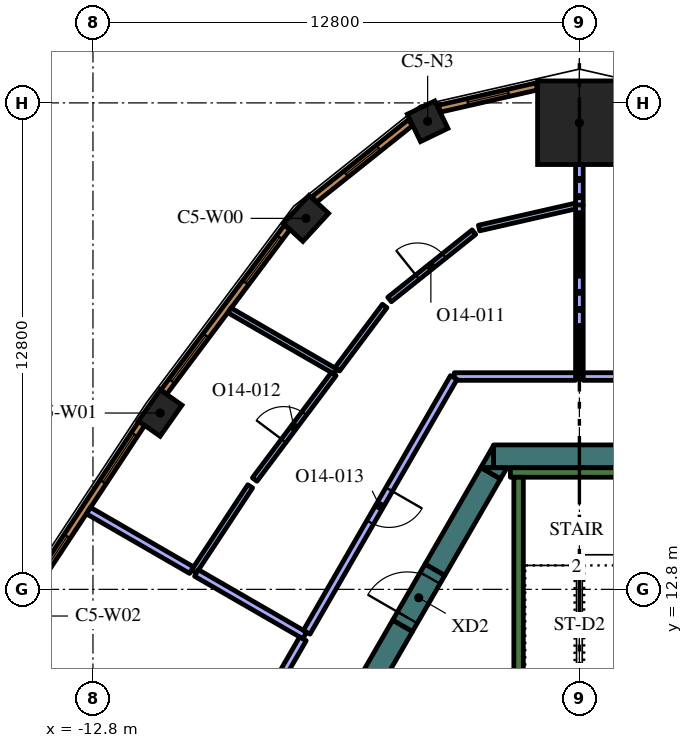
"""IFC4 building model, lengths in metres.
Left out: names, types, materials, properties, quantities, classifications, styles, units other than length and angle.
Written with IfcOpenShell. Run it as: python <this file> out.ifc"""

import sys

from ifc_helpers import new_model, si_unit, direction, frame, frame_2d, origin, origin_2d, place, context, subcontext, project, spatial, polyline, rectangle, outline, extrude, element, fill, save


model = new_model("IFC4")
c1 = context("Model", 3, precision=1e-05, world=origin(), true_north=direction((0.0, 1.0)))
c2 = subcontext(c1, "Body", "Model", "MODEL_VIEW")
j1 = project(units=[si_unit("LENGTHUNIT", "METRE"), si_unit("PLANEANGLEUNIT", "RADIAN")], contexts=[c1])
p1 = place(None, origin())
s1 = spatial("IfcSite", under=j1, at=p1, CompositionType="ELEMENT")
p2 = place(p1, origin())
s2 = spatial("IfcBuilding", under=s1, at=p2, CompositionType="ELEMENT")
p3 = place(p2, frame((0.0, 0.0, 304.8)))
s3 = spatial("IfcBuildingStorey", under=s2, at=p3, CompositionType="ELEMENT", Elevation=304.8)
p4 = place(p3, frame((0.0, 25.078, 0.0), z_axis=(0.0, 0.0, 1.0), x_axis=(0.0, 1.0, 0.0)))
e1 = element("IfcColumn", 1, at=p4, inside=s3, PredefinedType="COLUMN", context=c2, shape_type="SweptSolid", body=[
    extrude(rectangle(XDim=2.2, YDim=2.2, at=origin_2d()), origin(), (0.0, 0.0, 1.0), 4.2),
])
p5 = place(p3, frame((-3.993, 25.116, 0.0), z_axis=(0.0, 0.0, 1.0), x_axis=(-0.900873321869, -0.434082086644, 0.0)))
e2 = element("IfcColumn", 2, at=p5, inside=s3, PredefinedType="COLUMN", context=c2, shape_type="SweptSolid", body=[
    extrude(rectangle(XDim=0.8, YDim=0.8, at=origin_2d()), origin(), (0.0, 0.0, 1.0), 4.2),
])
for number, where, z_axis, x_axis in (
    (3, (-7.195, 22.561, 0.0), (0.0, 0.0, 1.0), (-0.676, -0.737, 0.0)),
    (4, (-11.032, 17.44, 0.0), (0.0, 0.0, 1.0), (-0.575, -0.818, 0.0)),
):
    element("IfcColumn", number, at=place(p3, frame(where, z_axis=z_axis, x_axis=x_axis)), inside=s3, PredefinedType="COLUMN", context=c2, shape_type="SweptSolid", body=[
        extrude(rectangle(XDim=1.0, YDim=0.7, at=origin_2d()), origin(), (0.0, 0.0, 1.0), 4.2),
    ])
p6 = place(p3, frame((-2.258, 16.3, 0.0), z_axis=(0.0, 0.0, 1.0), x_axis=(1.0, 0.0, 0.0)))
e5 = element("IfcWall", 5, at=p6, inside=s3, PredefinedType="SOLIDWALL", context=c2, shape_type="SweptSolid", body=[
    extrude(rectangle(XDim=3.823, YDim=0.6, at=frame_2d((1.912, 0.0))), origin(), (0.0, 0.0, 1.0), 4.2),
])
p7 = place(p3, origin())
e6 = element("IfcWall", 6, at=p7, inside=s3, PredefinedType="SOLIDWALL", context=c2, shape_type="SweptSolid", body=[
    extrude(outline(polyline([(-2.598, 16.0), (-2.26, 16.585), (-2.26, 16.0), (-2.598, 16.0)])), origin(), (0.0, 0.0, 1.0), 4.2),
])
p8 = place(p3, frame((-2.335, 15.855, 0.0), z_axis=(0.0, 0.0, 1.0), x_axis=(-0.499960127962, -0.866048422692, 0.0)))
e7 = element("IfcWall", 7, at=p8, inside=s3, PredefinedType="SOLIDWALL", context=c2, shape_type="SweptSolid", body=[
    extrude(rectangle(XDim=2.934, YDim=0.6, at=frame_2d((1.467, 0.0))), origin(), (0.0, 0.0, 1.0), 4.2),
])
e8 = element("IfcWall", 8, at=p7, inside=s3, PredefinedType="SOLIDWALL", context=c2, shape_type="SweptSolid", body=[
    extrude(outline(polyline([(-1.905, 16.0), (-2.074, 15.707), (-2.581, 16.0), (-1.905, 16.0)])), origin(), (0.0, 0.0, 1.0), 4.2),
])
p9 = place(p3, frame((-12.582, -1.892, 0.0), z_axis=(0.0, 0.0, 1.0), x_axis=(0.500003640647, 0.866023301845, 0.0)))
e9 = element("IfcWall", 9, at=p9, inside=s3, PredefinedType="SOLIDWALL", context=c2, shape_type="SweptSolid", body=[
    extrude(rectangle(XDim=15.858, YDim=0.6, at=frame_2d((7.929, 0.0))), origin(), (0.0, 0.0, 1.0), 4.2),
])
p10 = place(p3, frame((-1.817, 15.875, 0.0), z_axis=(0.0, 0.0, 1.0), x_axis=(1.0, 0.0, 0.0)))
e10 = element("IfcWall", 10, at=p10, inside=s3, PredefinedType="SOLIDWALL", context=c2, shape_type="SweptSolid", body=[
    extrude(rectangle(XDim=3.634, YDim=0.25, at=frame_2d((1.817, 0.0))), origin(), (0.0, 0.0, 1.0), 4.2),
])
p11 = place(p3, frame((-1.6, 8.7, 0.0), z_axis=(0.0, 0.0, 1.0), x_axis=(0.0, 1.0, 0.0)))
e11 = element("IfcWall", 11, at=p11, inside=s3, PredefinedType="SOLIDWALL", context=c2, shape_type="SweptSolid", body=[
    extrude(rectangle(XDim=7.05, YDim=0.25, at=frame_2d((3.525, 0.0))), origin(), (0.0, 0.0, 1.0), 4.2),
])
p12 = place(p3, frame((-4.652, 11.842, 0.0), z_axis=(0.0, 0.0, 1.0), x_axis=(0.500062241894, 0.865989465428, 0.0)))
e12 = element("IfcWall", 12, at=p12, inside=s3, PredefinedType="SOLIDWALL", context=c2, shape_type="SweptSolid", body=[
    extrude(rectangle(XDim=1.7, YDim=0.6, at=frame_2d((0.85, 0.0))), origin(), (0.0, 0.0, 1.0), 4.2),
])
p13 = place(p12, frame((0.25, 0.0, 0.0)))
e13 = element("IfcOpeningElement", 13, at=p13, cuts=e12, PredefinedType="OPENING", context=c2, shape_type="SweptSolid", body=[
    extrude(rectangle(XDim=1.2, YDim=2.1, at=frame_2d((0.6, 1.05))), frame((0.0, 0.31, 0.0), z_axis=(0.0, -1.0, 0.0), x_axis=(1.0, 0.0, 0.0)), (0.0, 0.0, 1.0), 0.62),
])
p14 = place(p3, frame((0.0, 22.906, 0.0), z_axis=(0.0, 0.0, 1.0), x_axis=(0.0, 1.0, 0.0)))
e14 = element("IfcWall", 14, at=p14, inside=s3, PredefinedType="PARTITIONING", context=c2, shape_type="SweptSolid", body=[
    extrude(rectangle(XDim=1.072, YDim=0.2, at=frame_2d((0.536, 0.0))), origin(), (0.0, 0.0, 1.0), 3.55),
])
p15 = place(p3, frame((0.0, 18.4, 0.0), z_axis=(0.0, 0.0, 1.0), x_axis=(0.0, 1.0, 0.0)))
e15 = element("IfcWall", 15, at=p15, inside=s3, PredefinedType="PARTITIONING", context=c2, shape_type="SweptSolid", body=[
    extrude(rectangle(XDim=4.514, YDim=0.2, at=frame_2d((2.257, 0.0))), origin(), (0.0, 0.0, 1.0), 3.55),
])
p16 = place(p3, frame((3.261, 18.4, 0.0), z_axis=(0.0, 0.0, 1.0), x_axis=(-1.0, 0.0, 0.0)))
e16 = element("IfcWall", 16, at=p16, inside=s3, PredefinedType="PARTITIONING", context=c2, shape_type="SweptSolid", body=[
    extrude(rectangle(XDim=3.161, YDim=0.2, at=frame_2d((1.581, 0.0))), origin(), (0.0, 0.0, 1.0), 3.55),
])
p17 = place(p3, frame((-6.417, 18.53, 0.0), z_axis=(0.0, 0.0, 1.0), x_axis=(-0.866034203951, 0.499984757355, 0.0)))
e17 = element("IfcWall", 17, at=p17, inside=s3, PredefinedType="PARTITIONING", context=c2, shape_type="SweptSolid", body=[
    extrude(rectangle(XDim=3.223, YDim=0.15, at=frame_2d((1.611, 0.0))), origin(), (0.0, 0.0, 1.0), 3.55),
])
p18 = place(p3, frame((-0.1, 22.887, 0.0), z_axis=(0.0, 0.0, 1.0), x_axis=(-0.974895716418, -0.222661945805, 0.0)))
e18 = element("IfcWall", 18, at=p18, inside=s3, PredefinedType="PARTITIONING", context=c2, shape_type="SweptSolid", body=[
    extrude(rectangle(XDim=2.605, YDim=0.15, at=frame_2d((1.303, 0.0))), origin(), (0.0, 0.0, 1.0), 3.55),
])
p19 = place(p3, frame((-4.995, 20.427, 0.0), z_axis=(0.0, 0.0, 1.0), x_axis=(0.781622833459, 0.62375134967, 0.0)))
e19 = element("IfcWall", 19, at=p19, inside=s3, PredefinedType="PARTITIONING", context=c2, shape_type="SweptSolid", body=[
    extrude(rectangle(XDim=2.841, YDim=0.15, at=frame_2d((1.42, 0.0))), origin(), (0.0, 0.0, 1.0), 3.55),
])
p20 = place(p19, frame((0.941, 0.0, 0.0)))
e20 = element("IfcOpeningElement", 20, at=p20, cuts=e19, PredefinedType="OPENING", context=c2, shape_type="SweptSolid", body=[
    extrude(rectangle(XDim=0.9, YDim=2.1, at=frame_2d((0.45, 1.05))), frame((0.0, 0.085, 0.0), z_axis=(0.0, -1.0, 0.0), x_axis=(1.0, 0.0, 0.0)), (0.0, 0.0, 1.0), 0.17),
])
p21 = place(p3, frame((-5.124, 20.256, 0.0), z_axis=(0.0, 0.0, 1.0), x_axis=(-0.599549274705, -0.800337845663, 0.0)))
e21 = element("IfcWall", 21, at=p21, inside=s3, PredefinedType="PARTITIONING", context=c2, shape_type="SweptSolid", body=[
    extrude(rectangle(XDim=2.08, YDim=0.15, at=frame_2d((1.04, 0.0))), origin(), (0.0, 0.0, 1.0), 3.55),
])
p22 = place(p3, frame((-8.544, 15.69, 0.0), z_axis=(0.0, 0.0, 1.0), x_axis=(0.599538824769, 0.800345673815, 0.0)))
e22 = element("IfcWall", 22, at=p22, inside=s3, PredefinedType="PARTITIONING", context=c2, shape_type="SweptSolid", body=[
    extrude(rectangle(XDim=3.474, YDim=0.15, at=frame_2d((1.737, 0.0))), origin(), (0.0, 0.0, 1.0), 3.55),
])
p23 = place(p22, frame((1.274, 0.0, 0.0)))
e23 = element("IfcOpeningElement", 23, at=p23, cuts=e22, PredefinedType="OPENING", context=c2, shape_type="SweptSolid", body=[
    extrude(rectangle(XDim=0.9, YDim=2.1, at=frame_2d((0.45, 1.05))), frame((0.0, 0.085, 0.0), z_axis=(0.0, -1.0, 0.0), x_axis=(1.0, 0.0, 0.0)), (0.0, 0.0, 1.0), 0.17),
])
p24 = place(p3, frame((-8.662, 15.511, 0.0), z_axis=(0.0, 0.0, 1.0), x_axis=(-0.550792824442, -0.834641997831, 0.0)))
e24 = element("IfcWall", 24, at=p24, inside=s3, PredefinedType="PARTITIONING", context=c2, shape_type="SweptSolid", body=[
    extrude(rectangle(XDim=2.686, YDim=0.15, at=frame_2d((1.343, 0.0))), origin(), (0.0, 0.0, 1.0), 3.55),
])
p25 = place(p3, frame((-10.207, 13.306, 0.0), z_axis=(0.0, 0.0, 1.0), x_axis=(-0.866041434906, 0.499972232254, 0.0)))
e25 = element("IfcWall", 25, at=p25, inside=s3, PredefinedType="PARTITIONING", context=c2, shape_type="SweptSolid", body=[
    extrude(rectangle(XDim=3.131, YDim=0.2, at=frame_2d((1.565, 0.0))), origin(), (0.0, 0.0, 1.0), 3.55),
])
p26 = place(p3, frame((-7.226, 11.585, 0.0), z_axis=(0.0, 0.0, 1.0), x_axis=(-0.866034923029, 0.499983511822, 0.0)))
e26 = element("IfcWall", 26, at=p26, inside=s3, PredefinedType="PARTITIONING", context=c2, shape_type="SweptSolid", body=[
    extrude(rectangle(XDim=3.292, YDim=0.2, at=frame_2d((1.646, 0.0))), origin(), (0.0, 0.0, 1.0), 3.55),
])
p27 = place(p3, frame((-0.1, 18.4, 0.0), z_axis=(0.0, 0.0, 1.0), x_axis=(-1.0, 0.0, 0.0)))
e27 = element("IfcWall", 27, at=p27, inside=s3, PredefinedType="PARTITIONING", context=c2, shape_type="SweptSolid", body=[
    extrude(rectangle(XDim=3.191, YDim=0.2, at=frame_2d((1.595, 0.0))), origin(), (0.0, 0.0, 1.0), 3.55),
])
p28 = place(p3, frame((-3.306, 18.374, 0.0), z_axis=(0.0, 0.0, 1.0), x_axis=(-0.500000072396, -0.866025361987, 0.0)))
e28 = element("IfcWall", 28, at=p28, inside=s3, PredefinedType="PARTITIONING", context=c2, shape_type="SweptSolid", body=[
    extrude(rectangle(XDim=7.739, YDim=0.2, at=frame_2d((3.87, 0.0))), origin(), (0.0, 0.0, 1.0), 3.55),
])
p29 = place(p28, frame((3.4, 0.0, 0.0)))
e29 = element("IfcOpeningElement", 29, at=p29, cuts=e28, PredefinedType="OPENING", context=c2, shape_type="SweptSolid", body=[
    extrude(rectangle(XDim=1.0, YDim=2.1, at=frame_2d((0.5, 1.05))), frame((0.0, 0.11, 0.0), z_axis=(0.0, -1.0, 0.0), x_axis=(1.0, 0.0, 0.0)), (0.0, 0.0, 1.0), 0.22),
])
p30 = place(p3, frame((-7.275, 11.499, 0.0), z_axis=(0.0, 0.0, 1.0), x_axis=(-0.500025407441, -0.866010734295, 0.0)))
e30 = element("IfcWall", 30, at=p30, inside=s3, PredefinedType="PARTITIONING", context=c2, shape_type="SweptSolid", body=[
    extrude(rectangle(XDim=1.791, YDim=0.2, at=frame_2d((0.895, 0.0))), origin(), (0.0, 0.0, 1.0), 3.55),
])
p31 = place(p3, frame((-1.122, 26.033, 0.0), z_axis=(0.0, 0.0, 1.0), x_axis=(-0.974913273386, -0.222585060988, 0.0)))
e31 = element("IfcWall", 31, at=p31, inside=s3, PredefinedType="SOLIDWALL", context=c2, shape_type="SweptSolid", body=[
    extrude(rectangle(XDim=2.627, YDim=0.19, at=frame_2d((1.313, 0.0))), origin(), (0.0, 0.0, 1.0), 3.95),
])
p32 = place(p31, frame((0.763, 0.0, 0.6)))
e32 = element("IfcOpeningElement", 32, at=p32, cuts=e31, PredefinedType="OPENING", context=c2, shape_type="SweptSolid", body=[
    extrude(rectangle(XDim=1.1, YDim=2.85, at=frame_2d((0.55, 1.425))), frame((0.0, 0.105, 0.0), z_axis=(0.0, -1.0, 0.0), x_axis=(1.0, 0.0, 0.0)), (0.0, 0.0, 1.0), 0.21),
])
p33 = place(p3, frame((-4.448, 25.08, 0.0), z_axis=(0.0, 0.0, 1.0), x_axis=(-0.781626234064, -0.623747088349, 0.0)))
e33 = element("IfcWall", 33, at=p33, inside=s3, PredefinedType="SOLIDWALL", context=c2, shape_type="SweptSolid", body=[
    extrude(rectangle(XDim=3.237, YDim=0.19, at=frame_2d((1.618, 0.0))), origin(), (0.0, 0.0, 1.0), 3.95),
])
p34 = place(p33, frame((1.068, 0.0, 0.6)))
e34 = element("IfcOpeningElement", 34, at=p34, cuts=e33, PredefinedType="OPENING", context=c2, shape_type="SweptSolid", body=[
    extrude(rectangle(XDim=1.1, YDim=2.85, at=frame_2d((0.55, 1.425))), frame((0.0, 0.105, 0.0), z_axis=(0.0, -1.0, 0.0), x_axis=(1.0, 0.0, 0.0)), (0.0, 0.0, 1.0), 0.21),
])
p35 = place(p3, frame((-7.692, 22.324, 0.0), z_axis=(0.0, 0.0, 1.0), x_axis=(-0.599559865294, -0.800329911929, 0.0)))
e35 = element("IfcWall", 35, at=p35, inside=s3, PredefinedType="SOLIDWALL", context=c2, shape_type="SweptSolid", body=[
    extrude(rectangle(XDim=5.415, YDim=0.19, at=frame_2d((2.708, 0.0))), origin(), (0.0, 0.0, 1.0), 3.95),
])
p36 = place(p35, frame((0.323, 0.0, 0.6)))
e36 = element("IfcOpeningElement", 36, at=p36, cuts=e35, PredefinedType="OPENING", context=c2, shape_type="SweptSolid", body=[
    extrude(rectangle(XDim=1.5, YDim=2.85, at=frame_2d((0.75, 1.425))), frame((0.0, 0.105, 0.0), z_axis=(0.0, -1.0, 0.0), x_axis=(1.0, 0.0, 0.0)), (0.0, 0.0, 1.0), 0.21),
])
p37 = place(p35, frame((3.558, 0.0, 0.6)))
e37 = element("IfcOpeningElement", 37, at=p37, cuts=e35, PredefinedType="OPENING", context=c2, shape_type="SweptSolid", body=[
    extrude(rectangle(XDim=1.5, YDim=2.85, at=frame_2d((0.75, 1.425))), frame((0.0, 0.105, 0.0), z_axis=(0.0, -1.0, 0.0), x_axis=(1.0, 0.0, 0.0)), (0.0, 0.0, 1.0), 0.21),
])
p38 = place(p3, frame((-11.518, 17.166, 0.0), z_axis=(0.0, 0.0, 1.0), x_axis=(-0.550744054781, -0.83467417962, 0.0)))
e38 = element("IfcWall", 38, at=p38, inside=s3, PredefinedType="SOLIDWALL", context=c2, shape_type="SweptSolid", body=[
    extrude(rectangle(XDim=5.406, YDim=0.19, at=frame_2d((2.703, 0.0))), origin(), (0.0, 0.0, 1.0), 3.95),
])
p39 = place(p38, frame((0.346, 0.0, 0.6)))
e39 = element("IfcOpeningElement", 39, at=p39, cuts=e38, PredefinedType="OPENING", context=c2, shape_type="SweptSolid", body=[
    extrude(rectangle(XDim=1.5, YDim=2.85, at=frame_2d((0.75, 1.425))), frame((0.0, 0.105, 0.0), z_axis=(0.0, -1.0, 0.0), x_axis=(1.0, 0.0, 0.0)), (0.0, 0.0, 1.0), 0.21),
])
p40 = place(p38, frame((3.559, 0.0, 0.6)))
e40 = element("IfcOpeningElement", 40, at=p40, cuts=e38, PredefinedType="OPENING", context=c2, shape_type="SweptSolid", body=[
    extrude(rectangle(XDim=1.5, YDim=2.85, at=frame_2d((0.75, 1.425))), frame((0.0, 0.105, 0.0), z_axis=(0.0, -1.0, 0.0), x_axis=(1.0, 0.0, 0.0)), (0.0, 0.0, 1.0), 0.21),
])
p41 = place(p13, origin())
e41 = element("IfcDoor", 41, at=p41, inside=s3, OperationType="SINGLE_SWING_LEFT", PredefinedType="DOOR", context=c2, shape_type="SweptSolid", body=[
    extrude(rectangle(XDim=1.2, YDim=2.1, at=frame_2d((0.6, 1.05))), frame((0.0, 0.025, 0.0), z_axis=(0.0, -1.0, 0.0), x_axis=(1.0, 0.0, 0.0)), (0.0, 0.0, 1.0), 0.05),
])
fill(e13, e41)
p42 = place(p20, origin())
e42 = element("IfcDoor", 42, at=p42, inside=s3, OperationType="SINGLE_SWING_LEFT", PredefinedType="DOOR", context=c2, shape_type="SweptSolid", body=[
    extrude(rectangle(XDim=0.9, YDim=2.1, at=frame_2d((0.45, 1.05))), frame((0.0, 0.025, 0.0), z_axis=(0.0, -1.0, 0.0), x_axis=(1.0, 0.0, 0.0)), (0.0, 0.0, 1.0), 0.05),
])
fill(e20, e42)
p43 = place(p23, origin())
e43 = element("IfcDoor", 43, at=p43, inside=s3, OperationType="SINGLE_SWING_LEFT", PredefinedType="DOOR", context=c2, shape_type="SweptSolid", body=[
    extrude(rectangle(XDim=0.9, YDim=2.1, at=frame_2d((0.45, 1.05))), frame((0.0, 0.025, 0.0), z_axis=(0.0, -1.0, 0.0), x_axis=(1.0, 0.0, 0.0)), (0.0, 0.0, 1.0), 0.05),
])
fill(e23, e43)
p44 = place(p29, origin())
e44 = element("IfcDoor", 44, at=p44, inside=s3, OperationType="SINGLE_SWING_RIGHT", PredefinedType="DOOR", context=c2, shape_type="SweptSolid", body=[
    extrude(rectangle(XDim=1.0, YDim=2.1, at=frame_2d((0.5, 1.05))), frame((0.0, 0.025, 0.0), z_axis=(0.0, -1.0, 0.0), x_axis=(1.0, 0.0, 0.0)), (0.0, 0.0, 1.0), 0.05),
])
fill(e29, e44)
p45 = place(p32, origin())
e45 = element("IfcWindow", 45, at=p45, inside=s3, PartitioningType="SINGLE_PANEL", PredefinedType="WINDOW", context=c2, shape_type="SweptSolid", body=[
    extrude(rectangle(XDim=1.1, YDim=2.85, at=frame_2d((0.55, 1.425))), frame((0.0, 0.045, 0.0), z_axis=(0.0, -1.0, 0.0), x_axis=(1.0, 0.0, 0.0)), (0.0, 0.0, 1.0), 0.06),
])
fill(e32, e45)
p46 = place(p34, origin())
e46 = element("IfcWindow", 46, at=p46, inside=s3, PartitioningType="SINGLE_PANEL", PredefinedType="WINDOW", context=c2, shape_type="SweptSolid", body=[
    extrude(rectangle(XDim=1.1, YDim=2.85, at=frame_2d((0.55, 1.425))), frame((0.0, 0.045, 0.0), z_axis=(0.0, -1.0, 0.0), x_axis=(1.0, 0.0, 0.0)), (0.0, 0.0, 1.0), 0.06),
])
fill(e34, e46)
p47 = place(p36, origin())
e47 = element("IfcWindow", 47, at=p47, inside=s3, PartitioningType="SINGLE_PANEL", PredefinedType="WINDOW", context=c2, shape_type="SweptSolid", body=[
    extrude(rectangle(XDim=1.5, YDim=2.85, at=frame_2d((0.75, 1.425))), frame((0.0, 0.045, 0.0), z_axis=(0.0, -1.0, 0.0), x_axis=(1.0, 0.0, 0.0)), (0.0, 0.0, 1.0), 0.06),
])
fill(e36, e47)
p48 = place(p37, origin())
e48 = element("IfcWindow", 48, at=p48, inside=s3, PartitioningType="SINGLE_PANEL", PredefinedType="WINDOW", context=c2, shape_type="SweptSolid", body=[
    extrude(rectangle(XDim=1.5, YDim=2.85, at=frame_2d((0.75, 1.425))), frame((0.0, 0.045, 0.0), z_axis=(0.0, -1.0, 0.0), x_axis=(1.0, 0.0, 0.0)), (0.0, 0.0, 1.0), 0.06),
])
fill(e37, e48)
p49 = place(p39, origin())
e49 = element("IfcWindow", 49, at=p49, inside=s3, PartitioningType="SINGLE_PANEL", PredefinedType="WINDOW", context=c2, shape_type="SweptSolid", body=[
    extrude(rectangle(XDim=1.5, YDim=2.85, at=frame_2d((0.75, 1.425))), frame((0.0, 0.045, 0.0), z_axis=(0.0, -1.0, 0.0), x_axis=(1.0, 0.0, 0.0)), (0.0, 0.0, 1.0), 0.06),
])
fill(e39, e49)
p50 = place(p40, origin())
e50 = element("IfcWindow", 50, at=p50, inside=s3, PartitioningType="SINGLE_PANEL", PredefinedType="WINDOW", context=c2, shape_type="SweptSolid", body=[
    extrude(rectangle(XDim=1.5, YDim=2.85, at=frame_2d((0.75, 1.425))), frame((0.0, 0.045, 0.0), z_axis=(0.0, -1.0, 0.0), x_axis=(1.0, 0.0, 0.0)), (0.0, 0.0, 1.0), 0.06),
])
fill(e40, e50)
save(model, sys.argv[1])
